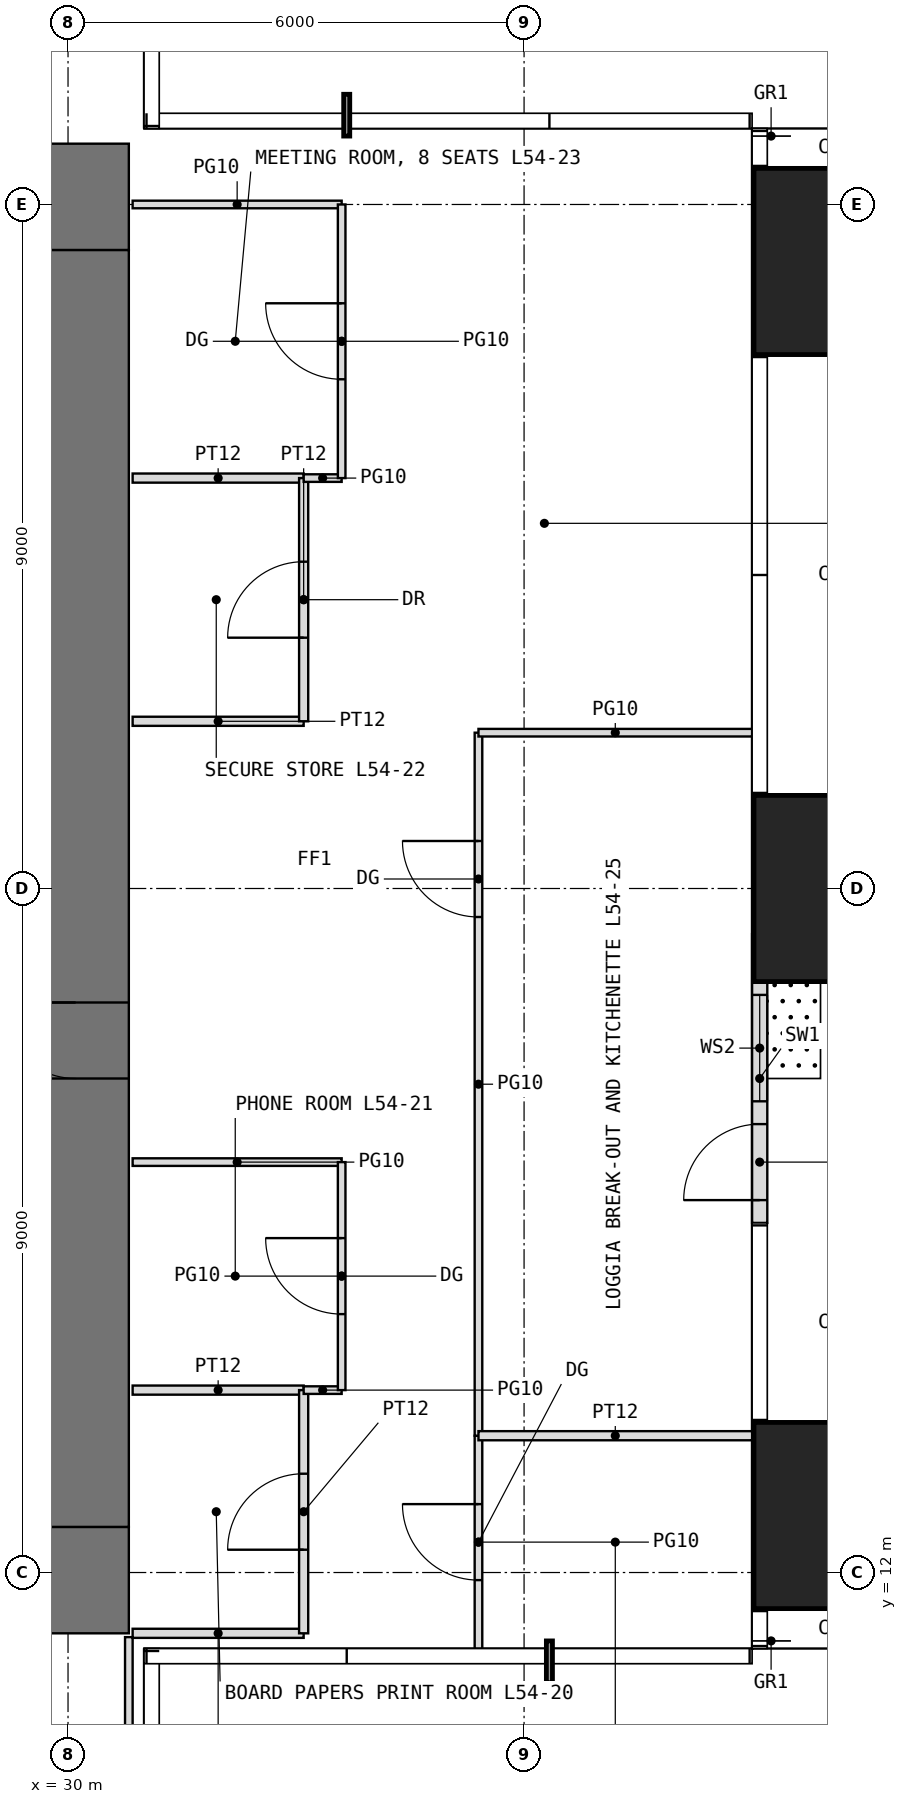
"""IFC4 building model, lengths in metres.
Left out: names, types, materials, properties, quantities, classifications, styles, units other than length and angle.
Written with IfcOpenShell. Run it as: python <this file> out.ifc"""

import sys

from ifc_helpers import new_model, si_unit, direction, frame, frame_2d, origin, origin_2d, place, context, subcontext, project, spatial, rectangle, extrude, element, fill, save


model = new_model("IFC4")
c1 = context("Model", 3, precision=1e-05, world=origin(), true_north=direction((0.0, 1.0)))
c2 = subcontext(c1, "Body", "Model", "MODEL_VIEW")
j1 = project(units=[si_unit("LENGTHUNIT", "METRE"), si_unit("PLANEANGLEUNIT", "RADIAN")], contexts=[c1])
p1 = place(None, origin())
s1 = spatial("IfcSite", under=j1, at=p1, CompositionType="ELEMENT")
p2 = place(p1, origin())
s2 = spatial("IfcBuilding", under=s1, at=p2, CompositionType="ELEMENT")
p3 = place(p2, frame((0.0, 0.0, 226.5)))
s3 = spatial("IfcBuildingStorey", under=s2, at=p3, CompositionType="ELEMENT", Elevation=226.5)
for number, where, z_axis, x_axis in (
    (1, (40.25, 12.75, 0.0), (0.0, 0.0, 1.0), (1.0, 0.0, 0.0)),
    (2, (40.25, 21.0, 0.0), (0.0, 0.0, 1.0), (1.0, 0.0, 0.0)),
    (3, (40.25, 29.25, 0.0), (0.0, 0.0, 1.0), (1.0, 0.0, 0.0)),
):
    element("IfcColumn", number, at=place(p3, frame(where, z_axis=z_axis, x_axis=x_axis)), inside=s3, PredefinedType="COLUMN", context=c2, shape_type="SweptSolid", body=[
        extrude(rectangle(XDim=2.45, YDim=2.45, at=origin_2d()), origin(), (0.0, 0.0, 1.0), 4.0),
    ])
p4 = place(p3, frame((39.1, 16.6, 0.0), z_axis=(0.0, 0.0, 1.0), x_axis=(0.0, 1.0, 0.0)))
e4 = element("IfcWall", 4, at=p4, inside=s3, PredefinedType="USERDEFINED", context=c2, shape_type="SweptSolid", body=[
    extrude(rectangle(XDim=3.8, YDim=0.2, at=frame_2d((1.9, 0.0))), origin(), (0.0, 0.0, 1.0), 3.75),
])
p5 = place(p4, frame((0.3, 0.0, 0.0)))
e5 = element("IfcOpeningElement", 5, at=p5, cuts=e4, PredefinedType="OPENING", context=c2, shape_type="SweptSolid", body=[
    extrude(rectangle(XDim=1.0, YDim=2.4, at=frame_2d((0.5, 1.2))), frame((0.0, 0.11, 0.0), z_axis=(0.0, -1.0, 0.0), x_axis=(1.0, 0.0, 0.0)), (0.0, 0.0, 1.0), 0.22),
])
p6 = place(p4, frame((1.6, 0.0, 0.3)))
e6 = element("IfcOpeningElement", 6, at=p6, cuts=e4, PredefinedType="OPENING", context=c2, shape_type="SweptSolid", body=[
    extrude(rectangle(XDim=1.4, YDim=2.7, at=frame_2d((0.7, 1.35))), frame((0.0, 0.11, 0.0), z_axis=(0.0, -1.0, 0.0), x_axis=(1.0, 0.0, 0.0)), (0.0, 0.0, 1.0), 0.22),
])
p7 = place(p3, frame((11.2, 11.9, -0.05), z_axis=(0.0, 0.0, 1.0), x_axis=(1.0, 0.0, 0.0)))
e7 = element("IfcWall", 7, at=p7, inside=s3, PredefinedType="SHEAR", context=c2, shape_type="SweptSolid", body=[
    extrude(rectangle(XDim=19.6, YDim=1.4, at=frame_2d((9.8, 0.0))), origin(), (0.0, 0.0, 1.0), 4.0),
])
p8 = place(p7, frame((8.8, 0.0, 0.05)))
e8 = element("IfcOpeningElement", 8, at=p8, cuts=e7, PredefinedType="OPENING", context=c2, shape_type="SweptSolid", body=[
    extrude(rectangle(XDim=2.0, YDim=2.2, at=frame_2d((1.0, 1.1))), frame((0.0, 0.71, 0.0), z_axis=(0.0, -1.0, 0.0), x_axis=(1.0, 0.0, 0.0)), (0.0, 0.0, 1.0), 1.42),
])
p9 = place(p3, frame((11.2, 30.1, -0.05), z_axis=(0.0, 0.0, 1.0), x_axis=(1.0, 0.0, 0.0)))
e9 = element("IfcWall", 9, at=p9, inside=s3, PredefinedType="SHEAR", context=c2, shape_type="SweptSolid", body=[
    extrude(rectangle(XDim=19.6, YDim=1.4, at=frame_2d((9.8, 0.0))), origin(), (0.0, 0.0, 1.0), 4.0),
])
p10 = place(p9, frame((8.8, 0.0, 0.05)))
e10 = element("IfcOpeningElement", 10, at=p10, cuts=e9, PredefinedType="OPENING", context=c2, shape_type="SweptSolid", body=[
    extrude(rectangle(XDim=2.0, YDim=2.2, at=frame_2d((1.0, 1.1))), frame((0.0, 0.71, 0.0), z_axis=(0.0, -1.0, 0.0), x_axis=(1.0, 0.0, 0.0)), (0.0, 0.0, 1.0), 1.42),
])
p11 = place(p3, frame((30.1, 12.6, -0.05), z_axis=(0.0, 0.0, 1.0), x_axis=(0.0, 1.0, 0.0)))
e11 = element("IfcWall", 11, at=p11, inside=s3, PredefinedType="SHEAR", context=c2, shape_type="SweptSolid", body=[
    extrude(rectangle(XDim=16.8, YDim=1.4, at=frame_2d((8.4, 0.0))), origin(), (0.0, 0.0, 1.0), 4.0),
])
p12 = place(p11, frame((5.9, 0.0, 0.05)))
e12 = element("IfcOpeningElement", 12, at=p12, cuts=e11, PredefinedType="OPENING", context=c2, shape_type="SweptSolid", body=[
    extrude(rectangle(XDim=1.0, YDim=2.2, at=frame_2d((0.5, 1.1))), frame((0.0, 0.71, 0.0), z_axis=(0.0, -1.0, 0.0), x_axis=(1.0, 0.0, 0.0)), (0.0, 0.0, 1.0), 1.42),
])
p13 = place(p3, frame((30.8, 6.6, 0.0), z_axis=(0.0, 0.0, 1.0), x_axis=(0.0, 1.0, 0.0)))
e13 = element("IfcWall", 13, at=p13, inside=s3, PredefinedType="PARTITIONING", context=c2, shape_type="SweptSolid", body=[
    extrude(rectangle(XDim=4.55, YDim=0.1, at=frame_2d((2.275, 0.0))), origin(), (0.0, 0.0, 1.0), 3.75),
])
for number, where, z_axis, x_axis in (
    (14, (30.85, 11.2, 0.0), (0.0, 0.0, 1.0), (1.0, 0.0, 0.0)),
    (15, (30.85, 14.4, 0.0), (0.0, 0.0, 1.0), (1.0, 0.0, 0.0)),
):
    element("IfcWall", number, at=place(p3, frame(where, z_axis=z_axis, x_axis=x_axis)), inside=s3, PredefinedType="PARTITIONING", context=c2, shape_type="SweptSolid", body=[
        extrude(rectangle(XDim=2.25, YDim=0.12, at=frame_2d((1.125, 0.0))), origin(), (0.0, 0.0, 1.0), 3.75),
    ])
p14 = place(p3, frame((30.85, 17.4, 0.0), z_axis=(0.0, 0.0, 1.0), x_axis=(1.0, 0.0, 0.0)))
e16 = element("IfcWall", 16, at=p14, inside=s3, PredefinedType="PARTITIONING", context=c2, shape_type="SweptSolid", body=[
    extrude(rectangle(XDim=2.75, YDim=0.1, at=frame_2d((1.375, 0.0))), origin(), (0.0, 0.0, 1.0), 3.75),
])
for number, where, z_axis, x_axis in (
    (17, (30.85, 23.2, 0.0), (0.0, 0.0, 1.0), (1.0, 0.0, 0.0)),
    (18, (30.85, 26.4, 0.0), (0.0, 0.0, 1.0), (1.0, 0.0, 0.0)),
):
    element("IfcWall", number, at=place(p3, frame(where, z_axis=z_axis, x_axis=x_axis)), inside=s3, PredefinedType="PARTITIONING", context=c2, shape_type="SweptSolid", body=[
        extrude(rectangle(XDim=2.25, YDim=0.12, at=frame_2d((1.125, 0.0))), origin(), (0.0, 0.0, 1.0), 3.75),
    ])
p15 = place(p3, frame((30.85, 30.0, 0.0), z_axis=(0.0, 0.0, 1.0), x_axis=(1.0, 0.0, 0.0)))
e19 = element("IfcWall", 19, at=p15, inside=s3, PredefinedType="PARTITIONING", context=c2, shape_type="SweptSolid", body=[
    extrude(rectangle(XDim=2.75, YDim=0.1, at=frame_2d((1.375, 0.0))), origin(), (0.0, 0.0, 1.0), 3.75),
])
p16 = place(p3, frame((33.1, 11.2, 0.0), z_axis=(0.0, 0.0, 1.0), x_axis=(0.0, 1.0, 0.0)))
e20 = element("IfcWall", 20, at=p16, inside=s3, PredefinedType="PARTITIONING", context=c2, shape_type="SweptSolid", body=[
    extrude(rectangle(XDim=3.2, YDim=0.12, at=frame_2d((1.6, 0.0))), origin(), (0.0, 0.0, 1.0), 3.75),
])
p17 = place(p16, frame((1.1, 0.0, 0.0)))
e21 = element("IfcOpeningElement", 21, at=p17, cuts=e20, PredefinedType="OPENING", context=c2, shape_type="SweptSolid", body=[
    extrude(rectangle(XDim=1.0, YDim=2.2, at=frame_2d((0.5, 1.1))), frame((0.0, 0.07, 0.0), z_axis=(0.0, -1.0, 0.0), x_axis=(1.0, 0.0, 0.0)), (0.0, 0.0, 1.0), 0.14),
])
p18 = place(p3, frame((33.1, 14.4, 0.0), z_axis=(0.0, 0.0, 1.0), x_axis=(1.0, 0.0, 0.0)))
e22 = element("IfcWall", 22, at=p18, inside=s3, PredefinedType="PARTITIONING", context=c2, shape_type="SweptSolid", body=[
    extrude(rectangle(XDim=0.5, YDim=0.1, at=frame_2d((0.25, 0.0))), origin(), (0.0, 0.0, 1.0), 3.75),
])
p19 = place(p3, frame((33.1, 23.2, 0.0), z_axis=(0.0, 0.0, 1.0), x_axis=(0.0, 1.0, 0.0)))
e23 = element("IfcWall", 23, at=p19, inside=s3, PredefinedType="PARTITIONING", context=c2, shape_type="SweptSolid", body=[
    extrude(rectangle(XDim=3.2, YDim=0.12, at=frame_2d((1.6, 0.0))), origin(), (0.0, 0.0, 1.0), 3.75),
])
p20 = place(p19, frame((1.1, 0.0, 0.0)))
e24 = element("IfcOpeningElement", 24, at=p20, cuts=e23, PredefinedType="OPENING", context=c2, shape_type="SweptSolid", body=[
    extrude(rectangle(XDim=1.0, YDim=2.2, at=frame_2d((0.5, 1.1))), frame((0.0, 0.07, 0.0), z_axis=(0.0, -1.0, 0.0), x_axis=(1.0, 0.0, 0.0)), (0.0, 0.0, 1.0), 0.14),
])
p21 = place(p3, frame((33.1, 26.4, 0.0), z_axis=(0.0, 0.0, 1.0), x_axis=(1.0, 0.0, 0.0)))
e25 = element("IfcWall", 25, at=p21, inside=s3, PredefinedType="PARTITIONING", context=c2, shape_type="SweptSolid", body=[
    extrude(rectangle(XDim=0.5, YDim=0.1, at=frame_2d((0.25, 0.0))), origin(), (0.0, 0.0, 1.0), 3.75),
])
p22 = place(p3, frame((33.6, 14.4, 0.0), z_axis=(0.0, 0.0, 1.0), x_axis=(0.0, 1.0, 0.0)))
e26 = element("IfcWall", 26, at=p22, inside=s3, PredefinedType="PARTITIONING", context=c2, shape_type="SweptSolid", body=[
    extrude(rectangle(XDim=3.0, YDim=0.1, at=frame_2d((1.5, 0.0))), origin(), (0.0, 0.0, 1.0), 3.75),
])
p23 = place(p22, frame((1.0, 0.0, 0.0)))
e27 = element("IfcOpeningElement", 27, at=p23, cuts=e26, PredefinedType="OPENING", context=c2, shape_type="SweptSolid", body=[
    extrude(rectangle(XDim=1.0, YDim=2.4, at=frame_2d((0.5, 1.2))), frame((0.0, 0.06, 0.0), z_axis=(0.0, -1.0, 0.0), x_axis=(1.0, 0.0, 0.0)), (0.0, 0.0, 1.0), 0.12),
])
p24 = place(p3, frame((33.6, 26.4, 0.0), z_axis=(0.0, 0.0, 1.0), x_axis=(0.0, 1.0, 0.0)))
e28 = element("IfcWall", 28, at=p24, inside=s3, PredefinedType="PARTITIONING", context=c2, shape_type="SweptSolid", body=[
    extrude(rectangle(XDim=3.6, YDim=0.1, at=frame_2d((1.8, 0.0))), origin(), (0.0, 0.0, 1.0), 3.75),
])
p25 = place(p24, frame((1.3, 0.0, 0.0)))
e29 = element("IfcOpeningElement", 29, at=p25, cuts=e28, PredefinedType="OPENING", context=c2, shape_type="SweptSolid", body=[
    extrude(rectangle(XDim=1.0, YDim=2.4, at=frame_2d((0.5, 1.2))), frame((0.0, 0.06, 0.0), z_axis=(0.0, -1.0, 0.0), x_axis=(1.0, 0.0, 0.0)), (0.0, 0.0, 1.0), 0.12),
])
p26 = place(p3, frame((35.4, 11.0, 0.0), z_axis=(0.0, 0.0, 1.0), x_axis=(0.0, 1.0, 0.0)))
e30 = element("IfcWall", 30, at=p26, inside=s3, PredefinedType="PARTITIONING", context=c2, shape_type="SweptSolid", body=[
    extrude(rectangle(XDim=2.8, YDim=0.1, at=frame_2d((1.4, 0.0))), origin(), (0.0, 0.0, 1.0), 3.75),
])
p27 = place(p26, frame((0.9, 0.0, 0.0)))
e31 = element("IfcOpeningElement", 31, at=p27, cuts=e30, PredefinedType="OPENING", context=c2, shape_type="SweptSolid", body=[
    extrude(rectangle(XDim=1.0, YDim=2.4, at=frame_2d((0.5, 1.2))), frame((0.0, 0.06, 0.0), z_axis=(0.0, -1.0, 0.0), x_axis=(1.0, 0.0, 0.0)), (0.0, 0.0, 1.0), 0.12),
])
p28 = place(p3, frame((35.4, 13.8, 0.0), z_axis=(0.0, 0.0, 1.0), x_axis=(0.0, 1.0, 0.0)))
e32 = element("IfcWall", 32, at=p28, inside=s3, PredefinedType="PARTITIONING", context=c2, shape_type="SweptSolid", body=[
    extrude(rectangle(XDim=9.25, YDim=0.1, at=frame_2d((4.625, 0.0))), origin(), (0.0, 0.0, 1.0), 3.75),
])
p29 = place(p28, frame((6.825, 0.0, 0.0)))
e33 = element("IfcOpeningElement", 33, at=p29, cuts=e32, PredefinedType="OPENING", context=c2, shape_type="SweptSolid", body=[
    extrude(rectangle(XDim=1.0, YDim=2.4, at=frame_2d((0.5, 1.2))), frame((0.0, 0.06, 0.0), z_axis=(0.0, -1.0, 0.0), x_axis=(1.0, 0.0, 0.0)), (0.0, 0.0, 1.0), 0.12),
])
p30 = place(p3, frame((35.4, 13.8, 0.0), z_axis=(0.0, 0.0, 1.0), x_axis=(1.0, 0.0, 0.0)))
e34 = element("IfcWall", 34, at=p30, inside=s3, PredefinedType="PARTITIONING", context=c2, shape_type="SweptSolid", body=[
    extrude(rectangle(XDim=3.6, YDim=0.12, at=frame_2d((1.8, 0.0))), origin(), (0.0, 0.0, 1.0), 3.75),
])
p31 = place(p3, frame((35.4, 23.05, 0.0), z_axis=(0.0, 0.0, 1.0), x_axis=(1.0, 0.0, 0.0)))
e35 = element("IfcWall", 35, at=p31, inside=s3, PredefinedType="PARTITIONING", context=c2, shape_type="SweptSolid", body=[
    extrude(rectangle(XDim=3.6, YDim=0.1, at=frame_2d((1.8, 0.0))), origin(), (0.0, 0.0, 1.0), 3.75),
])
p32 = place(p5, origin())
e36 = element("IfcDoor", 36, at=p32, inside=s3, OperationType="SINGLE_SWING_LEFT", PredefinedType="DOOR", context=c2, shape_type="SweptSolid", body=[
    extrude(rectangle(XDim=1.0, YDim=2.4, at=frame_2d((0.5, 1.2))), frame((0.0, 0.025, 0.0), z_axis=(0.0, -1.0, 0.0), x_axis=(1.0, 0.0, 0.0)), (0.0, 0.0, 1.0), 0.05),
])
fill(e5, e36)
p33 = place(p6, origin())
e37 = element("IfcWindow", 37, at=p33, inside=s3, PartitioningType="SINGLE_PANEL", PredefinedType="WINDOW", context=c2, shape_type="SweptSolid", body=[
    extrude(rectangle(XDim=1.4, YDim=2.7, at=frame_2d((0.7, 1.35))), frame((0.0, 0.03, 0.0), z_axis=(0.0, -1.0, 0.0), x_axis=(1.0, 0.0, 0.0)), (0.0, 0.0, 1.0), 0.06),
])
fill(e6, e37)
p34 = place(p12, origin())
e38 = element("IfcDoor", 38, at=p34, inside=s3, OperationType="SINGLE_SWING_RIGHT", PredefinedType="DOOR", context=c2, shape_type="SweptSolid", body=[
    extrude(rectangle(XDim=1.0, YDim=2.2, at=frame_2d((0.5, 1.1))), frame((0.0, 0.025, 0.0), z_axis=(0.0, -1.0, 0.0), x_axis=(1.0, 0.0, 0.0)), (0.0, 0.0, 1.0), 0.05),
])
fill(e12, e38)
p35 = place(p17, origin())
e39 = element("IfcDoor", 39, at=p35, inside=s3, OperationType="SINGLE_SWING_LEFT", PredefinedType="DOOR", context=c2, shape_type="SweptSolid", body=[
    extrude(rectangle(XDim=1.0, YDim=2.2, at=frame_2d((0.5, 1.1))), frame((0.0, 0.025, 0.0), z_axis=(0.0, -1.0, 0.0), x_axis=(1.0, 0.0, 0.0)), (0.0, 0.0, 1.0), 0.05),
])
fill(e21, e39)
p36 = place(p23, origin())
e40 = element("IfcDoor", 40, at=p36, inside=s3, OperationType="SINGLE_SWING_RIGHT", PredefinedType="DOOR", context=c2, shape_type="SweptSolid", body=[
    extrude(rectangle(XDim=1.0, YDim=2.4, at=frame_2d((0.5, 1.2))), frame((0.0, 0.025, 0.0), z_axis=(0.0, -1.0, 0.0), x_axis=(1.0, 0.0, 0.0)), (0.0, 0.0, 1.0), 0.05),
])
fill(e27, e40)
p37 = place(p20, origin())
e41 = element("IfcDoor", 41, at=p37, inside=s3, OperationType="SINGLE_SWING_LEFT", PredefinedType="DOOR", context=c2, shape_type="SweptSolid", body=[
    extrude(rectangle(XDim=1.0, YDim=2.2, at=frame_2d((0.5, 1.1))), frame((0.0, 0.025, 0.0), z_axis=(0.0, -1.0, 0.0), x_axis=(1.0, 0.0, 0.0)), (0.0, 0.0, 1.0), 0.05),
])
fill(e24, e41)
p38 = place(p25, origin())
e42 = element("IfcDoor", 42, at=p38, inside=s3, OperationType="SINGLE_SWING_RIGHT", PredefinedType="DOOR", context=c2, shape_type="SweptSolid", body=[
    extrude(rectangle(XDim=1.0, YDim=2.4, at=frame_2d((0.5, 1.2))), frame((0.0, 0.025, 0.0), z_axis=(0.0, -1.0, 0.0), x_axis=(1.0, 0.0, 0.0)), (0.0, 0.0, 1.0), 0.05),
])
fill(e29, e42)
p39 = place(p27, origin())
e43 = element("IfcDoor", 43, at=p39, inside=s3, OperationType="SINGLE_SWING_RIGHT", PredefinedType="DOOR", context=c2, shape_type="SweptSolid", body=[
    extrude(rectangle(XDim=1.0, YDim=2.4, at=frame_2d((0.5, 1.2))), frame((0.0, 0.025, 0.0), z_axis=(0.0, -1.0, 0.0), x_axis=(1.0, 0.0, 0.0)), (0.0, 0.0, 1.0), 0.05),
])
fill(e31, e43)
p40 = place(p29, origin())
e44 = element("IfcDoor", 44, at=p40, inside=s3, OperationType="SINGLE_SWING_RIGHT", PredefinedType="DOOR", context=c2, shape_type="SweptSolid", body=[
    extrude(rectangle(XDim=1.0, YDim=2.4, at=frame_2d((0.5, 1.2))), frame((0.0, 0.025, 0.0), z_axis=(0.0, -1.0, 0.0), x_axis=(1.0, 0.0, 0.0)), (0.0, 0.0, 1.0), 0.05),
])
fill(e33, e44)
save(model, sys.argv[1])
